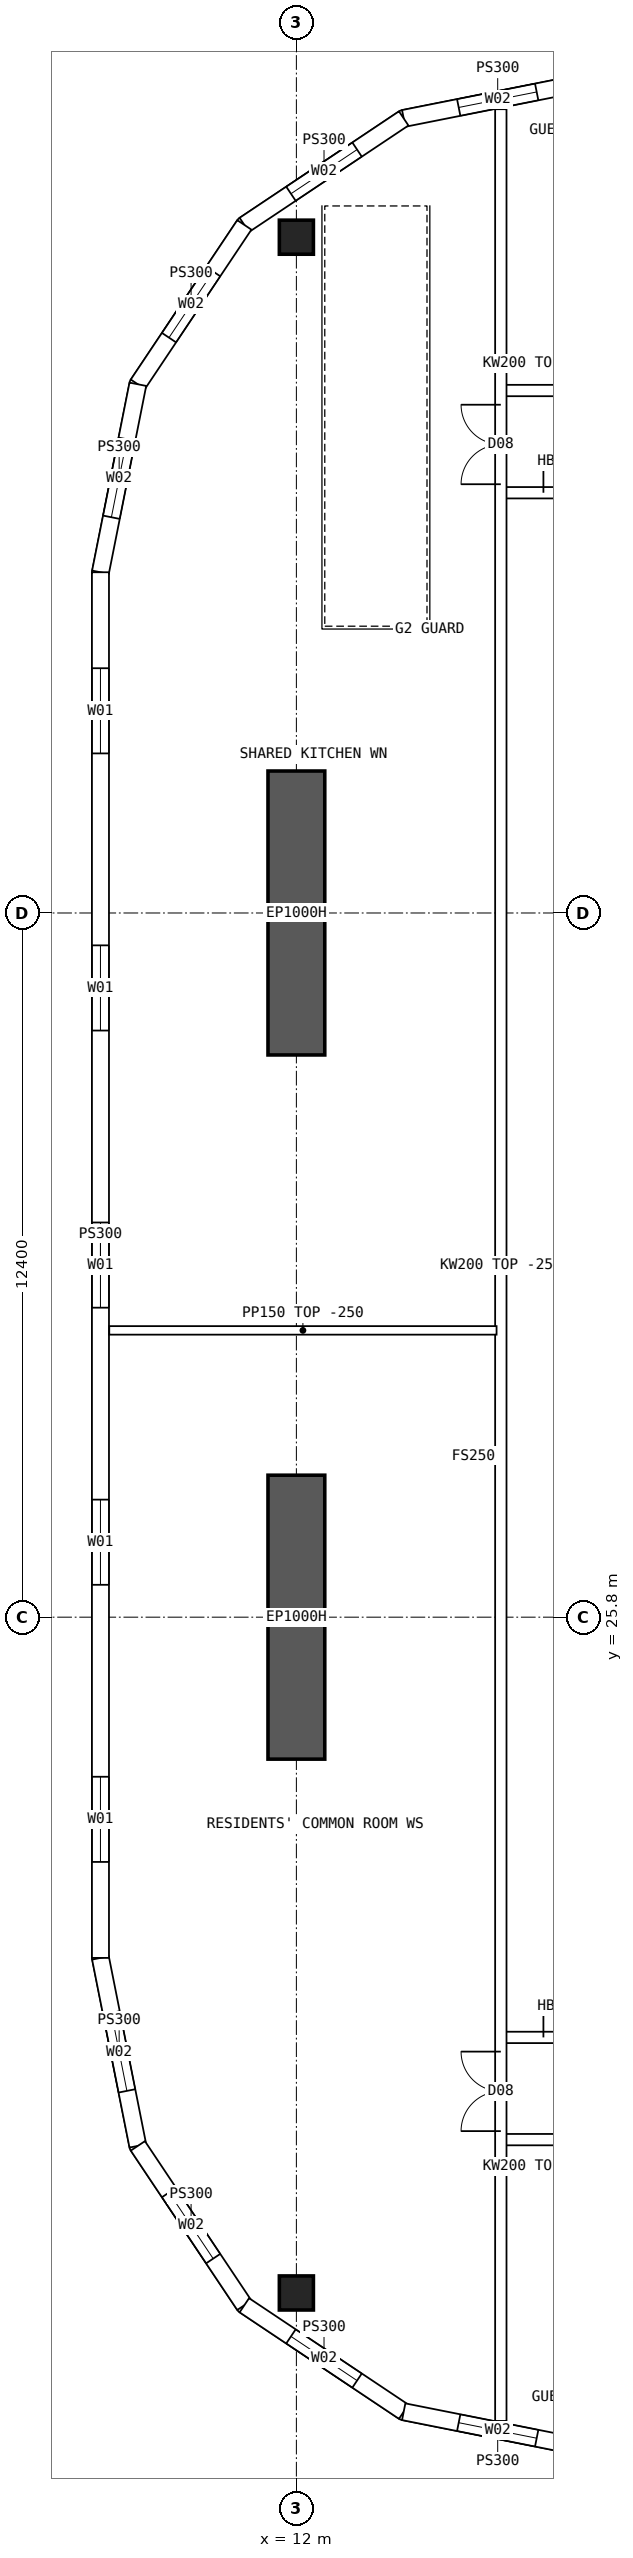
"""IFC4 building model, lengths in metres.
Left out: names, types, materials, properties, quantities, classifications, styles, units other than length and angle.
Written with IfcOpenShell. Run it as: python <this file> out.ifc"""

import sys

from ifc_helpers import new_model, si_unit, direction, frame, frame_2d, origin, origin_2d, place, context, subcontext, project, spatial, polyline, rectangle, hollow_rectangle, outline, extrude, element, fill, save


model = new_model("IFC4")
c1 = context("Model", 3, precision=1e-05, world=origin(), true_north=direction((0.0, 1.0)))
c2 = subcontext(c1, "Body", "Model", "MODEL_VIEW")
j1 = project(units=[si_unit("LENGTHUNIT", "METRE"), si_unit("PLANEANGLEUNIT", "RADIAN")], contexts=[c1])
p1 = place(None, origin())
s1 = spatial("IfcSite", under=j1, at=p1, CompositionType="ELEMENT")
p2 = place(p1, origin())
s2 = spatial("IfcBuilding", under=s1, at=p2, CompositionType="ELEMENT")
p3 = place(p2, frame((0.0, 0.0, 235.3)))
s3 = spatial("IfcBuildingStorey", under=s2, at=p3, CompositionType="ELEMENT", Elevation=235.3)
for number, where, z_axis, x_axis in (
    (1, (12.0, 13.9, 0.0), (0.0, 0.0, 1.0), (1.0, 0.0, 0.0)),
    (2, (12.0, 50.1, 0.0), (0.0, 0.0, 1.0), (1.0, 0.0, 0.0)),
):
    element("IfcColumn", number, at=place(p3, frame(where, z_axis=z_axis, x_axis=x_axis)), inside=s3, PredefinedType="COLUMN", context=c2, shape_type="SweptSolid", body=[
        extrude(hollow_rectangle(XDim=0.6, YDim=0.6, WallThickness=0.06, at=origin_2d()), origin(), (0.0, 0.0, 1.0), 3.75),
    ])
for number, where, z_axis, x_axis in (
    (3, (12.0, 23.3, 0.0), (0.0, 0.0, 1.0), (0.0, 1.0, 0.0)),
    (4, (12.0, 35.7, 0.0), (0.0, 0.0, 1.0), (0.0, 1.0, 0.0)),
):
    element("IfcWall", number, at=place(p3, frame(where, z_axis=z_axis, x_axis=x_axis)), inside=s3, PredefinedType="SHEAR", context=c2, shape_type="SweptSolid", body=[
        extrude(rectangle(XDim=5.0, YDim=1.0, at=frame_2d((2.5, 0.0))), origin(), (0.0, 0.0, 1.0), 3.75),
    ])
p4 = place(p3, frame((8.55, 44.2, 0.0), z_axis=(0.0, 0.0, 1.0), x_axis=(0.0, -1.0, 0.0)))
e5 = element("IfcWall", 5, at=p4, inside=s3, PredefinedType="SOLIDWALL", context=c2, shape_type="SweptSolid", body=[
    extrude(outline(polyline([(-0.015, -0.15), (24.415, -0.15), (24.385, 0.15), (0.015, 0.15), (-0.015, -0.15)])), origin(), (0.0, 0.0, 1.0), 3.5),
])
p5 = place(p4, frame((1.69, 0.0, 0.9)))
e6 = element("IfcOpeningElement", 6, at=p5, cuts=e5, PredefinedType="OPENING", context=c2, shape_type="SweptSolid", body=[
    extrude(rectangle(XDim=1.5, YDim=2.0, at=frame_2d((0.75, 1.0))), frame((0.0, 0.16, 0.0), z_axis=(0.0, -1.0, 0.0), x_axis=(1.0, 0.0, 0.0)), (0.0, 0.0, 1.0), 0.32),
])
p6 = place(p4, frame((6.57, 0.0, 0.9)))
e7 = element("IfcOpeningElement", 7, at=p6, cuts=e5, PredefinedType="OPENING", context=c2, shape_type="SweptSolid", body=[
    extrude(rectangle(XDim=1.5, YDim=2.0, at=frame_2d((0.75, 1.0))), frame((0.0, 0.16, 0.0), z_axis=(0.0, -1.0, 0.0), x_axis=(1.0, 0.0, 0.0)), (0.0, 0.0, 1.0), 0.32),
])
p7 = place(p4, frame((11.45, 0.0, 0.9)))
e8 = element("IfcOpeningElement", 8, at=p7, cuts=e5, PredefinedType="OPENING", context=c2, shape_type="SweptSolid", body=[
    extrude(rectangle(XDim=1.5, YDim=2.0, at=frame_2d((0.75, 1.0))), frame((0.0, 0.16, 0.0), z_axis=(0.0, -1.0, 0.0), x_axis=(1.0, 0.0, 0.0)), (0.0, 0.0, 1.0), 0.32),
])
p8 = place(p4, frame((16.33, 0.0, 0.9)))
e9 = element("IfcOpeningElement", 9, at=p8, cuts=e5, PredefinedType="OPENING", context=c2, shape_type="SweptSolid", body=[
    extrude(rectangle(XDim=1.5, YDim=2.0, at=frame_2d((0.75, 1.0))), frame((0.0, 0.16, 0.0), z_axis=(0.0, -1.0, 0.0), x_axis=(1.0, 0.0, 0.0)), (0.0, 0.0, 1.0), 0.32),
])
p9 = place(p4, frame((21.21, 0.0, 0.9)))
e10 = element("IfcOpeningElement", 10, at=p9, cuts=e5, PredefinedType="OPENING", context=c2, shape_type="SweptSolid", body=[
    extrude(rectangle(XDim=1.5, YDim=2.0, at=frame_2d((0.75, 1.0))), frame((0.0, 0.16, 0.0), z_axis=(0.0, -1.0, 0.0), x_axis=(1.0, 0.0, 0.0)), (0.0, 0.0, 1.0), 0.32),
])
p10 = place(p3, frame((17.2, 52.85, 0.0), z_axis=(0.0, 0.0, 1.0), x_axis=(-0.98078325777, -0.195100490205, 0.0)))
e11 = element("IfcWall", 11, at=p10, inside=s3, PredefinedType="SOLIDWALL", context=c2, shape_type="SweptSolid", body=[
    extrude(outline(polyline([(-0.03, -0.15), (3.405, -0.15), (3.345, 0.15), (0.03, 0.15), (-0.03, -0.15)])), origin(), (0.0, 0.0, 1.0), 3.5),
])
p11 = place(p10, frame((0.988, 0.0, 0.9)))
e12 = element("IfcOpeningElement", 12, at=p11, cuts=e11, PredefinedType="OPENING", context=c2, shape_type="SweptSolid", body=[
    extrude(rectangle(XDim=1.4, YDim=1.8, at=frame_2d((0.7, 0.9))), frame((0.0, 0.16, 0.0), z_axis=(0.0, -1.0, 0.0), x_axis=(1.0, 0.0, 0.0)), (0.0, 0.0, 1.0), 0.32),
])
p12 = place(p3, frame((13.89, 52.192, 0.0), z_axis=(0.0, 0.0, 1.0), x_axis=(-0.831460037396, -0.555584562613, 0.0)))
e13 = element("IfcWall", 13, at=p12, inside=s3, PredefinedType="SOLIDWALL", context=c2, shape_type="SweptSolid", body=[
    extrude(outline(polyline([(-0.03, -0.15), (3.405, -0.15), (3.345, 0.15), (0.03, 0.15), (-0.03, -0.15)])), origin(), (0.0, 0.0, 1.0), 3.5),
])
p13 = place(p12, frame((0.988, 0.0, 0.9)))
e14 = element("IfcOpeningElement", 14, at=p13, cuts=e13, PredefinedType="OPENING", context=c2, shape_type="SweptSolid", body=[
    extrude(rectangle(XDim=1.4, YDim=1.8, at=frame_2d((0.7, 0.9))), frame((0.0, 0.16, 0.0), z_axis=(0.0, -1.0, 0.0), x_axis=(1.0, 0.0, 0.0)), (0.0, 0.0, 1.0), 0.32),
])
p14 = place(p3, frame((11.083, 50.316, 0.0), z_axis=(0.0, 0.0, 1.0), x_axis=(-0.555567969291, -0.831471124873, 0.0)))
e15 = element("IfcWall", 15, at=p14, inside=s3, PredefinedType="SOLIDWALL", context=c2, shape_type="SweptSolid", body=[
    extrude(outline(polyline([(-0.03, -0.15), (3.405, -0.15), (3.345, 0.15), (0.03, 0.15), (-0.03, -0.15)])), origin(), (0.0, 0.0, 1.0), 3.5),
])
p15 = place(p14, frame((0.988, 0.0, 0.9)))
e16 = element("IfcOpeningElement", 16, at=p15, cuts=e15, PredefinedType="OPENING", context=c2, shape_type="SweptSolid", body=[
    extrude(rectangle(XDim=1.4, YDim=1.8, at=frame_2d((0.7, 0.9))), frame((0.0, 0.16, 0.0), z_axis=(0.0, -1.0, 0.0), x_axis=(1.0, 0.0, 0.0)), (0.0, 0.0, 1.0), 0.32),
])
p16 = place(p3, frame((9.208, 47.51, 0.0), z_axis=(0.0, 0.0, 1.0), x_axis=(-0.19508664885, -0.980786011034, 0.0)))
e17 = element("IfcWall", 17, at=p16, inside=s3, PredefinedType="SOLIDWALL", context=c2, shape_type="SweptSolid", body=[
    extrude(outline(polyline([(-0.03, -0.15), (3.39, -0.15), (3.36, 0.15), (0.03, 0.15), (-0.03, -0.15)])), origin(), (0.0, 0.0, 1.0), 3.5),
])
p17 = place(p16, frame((0.988, 0.0, 0.9)))
e18 = element("IfcOpeningElement", 18, at=p17, cuts=e17, PredefinedType="OPENING", context=c2, shape_type="SweptSolid", body=[
    extrude(rectangle(XDim=1.4, YDim=1.8, at=frame_2d((0.7, 0.9))), frame((0.0, 0.16, 0.0), z_axis=(0.0, -1.0, 0.0), x_axis=(1.0, 0.0, 0.0)), (0.0, 0.0, 1.0), 0.32),
])
p18 = place(p3, frame((8.55, 19.8, 0.0), z_axis=(0.0, 0.0, 1.0), x_axis=(0.19508664885, -0.980786011034, 0.0)))
e19 = element("IfcWall", 19, at=p18, inside=s3, PredefinedType="SOLIDWALL", context=c2, shape_type="SweptSolid", body=[
    extrude(outline(polyline([(-0.015, -0.15), (3.405, -0.15), (3.345, 0.15), (0.015, 0.15), (-0.015, -0.15)])), origin(), (0.0, 0.0, 1.0), 3.5),
])
p19 = place(p18, frame((0.988, 0.0, 0.9)))
e20 = element("IfcOpeningElement", 20, at=p19, cuts=e19, PredefinedType="OPENING", context=c2, shape_type="SweptSolid", body=[
    extrude(rectangle(XDim=1.4, YDim=1.8, at=frame_2d((0.7, 0.9))), frame((0.0, 0.16, 0.0), z_axis=(0.0, -1.0, 0.0), x_axis=(1.0, 0.0, 0.0)), (0.0, 0.0, 1.0), 0.32),
])
p20 = place(p3, frame((9.208, 16.49, 0.0), z_axis=(0.0, 0.0, 1.0), x_axis=(0.555567969291, -0.831471124873, 0.0)))
e21 = element("IfcWall", 21, at=p20, inside=s3, PredefinedType="SOLIDWALL", context=c2, shape_type="SweptSolid", body=[
    extrude(outline(polyline([(-0.03, -0.15), (3.405, -0.15), (3.345, 0.15), (0.03, 0.15), (-0.03, -0.15)])), origin(), (0.0, 0.0, 1.0), 3.5),
])
p21 = place(p20, frame((0.988, 0.0, 0.9)))
e22 = element("IfcOpeningElement", 22, at=p21, cuts=e21, PredefinedType="OPENING", context=c2, shape_type="SweptSolid", body=[
    extrude(rectangle(XDim=1.4, YDim=1.8, at=frame_2d((0.7, 0.9))), frame((0.0, 0.16, 0.0), z_axis=(0.0, -1.0, 0.0), x_axis=(1.0, 0.0, 0.0)), (0.0, 0.0, 1.0), 0.32),
])
p22 = place(p3, frame((11.083, 13.684, 0.0), z_axis=(0.0, 0.0, 1.0), x_axis=(0.831460037396, -0.555584562613, 0.0)))
e23 = element("IfcWall", 23, at=p22, inside=s3, PredefinedType="SOLIDWALL", context=c2, shape_type="SweptSolid", body=[
    extrude(outline(polyline([(-0.03, -0.15), (3.405, -0.15), (3.345, 0.15), (0.03, 0.15), (-0.03, -0.15)])), origin(), (0.0, 0.0, 1.0), 3.5),
])
p23 = place(p22, frame((0.988, 0.0, 0.9)))
e24 = element("IfcOpeningElement", 24, at=p23, cuts=e23, PredefinedType="OPENING", context=c2, shape_type="SweptSolid", body=[
    extrude(rectangle(XDim=1.4, YDim=1.8, at=frame_2d((0.7, 0.9))), frame((0.0, 0.16, 0.0), z_axis=(0.0, -1.0, 0.0), x_axis=(1.0, 0.0, 0.0)), (0.0, 0.0, 1.0), 0.32),
])
p24 = place(p3, frame((13.89, 11.808, 0.0), z_axis=(0.0, 0.0, 1.0), x_axis=(0.98078325777, -0.195100490205, 0.0)))
e25 = element("IfcWall", 25, at=p24, inside=s3, PredefinedType="SOLIDWALL", context=c2, shape_type="SweptSolid", body=[
    extrude(outline(polyline([(-0.03, -0.15), (3.405, -0.15), (3.345, 0.15), (0.03, 0.15), (-0.03, -0.15)])), origin(), (0.0, 0.0, 1.0), 3.5),
])
p25 = place(p24, frame((0.988, 0.0, 0.9)))
e26 = element("IfcOpeningElement", 26, at=p25, cuts=e25, PredefinedType="OPENING", context=c2, shape_type="SweptSolid", body=[
    extrude(rectangle(XDim=1.4, YDim=1.8, at=frame_2d((0.7, 0.9))), frame((0.0, 0.16, 0.0), z_axis=(0.0, -1.0, 0.0), x_axis=(1.0, 0.0, 0.0)), (0.0, 0.0, 1.0), 0.32),
])
p26 = place(p3, frame((15.6, 16.6, 0.0), z_axis=(0.0, 0.0, 1.0), x_axis=(1.0, 0.0, 0.0)))
e27 = element("IfcWall", 27, at=p26, inside=s3, PredefinedType="SOLIDWALL", context=c2, shape_type="SweptSolid", body=[
    extrude(rectangle(XDim=2.05, YDim=0.2, at=frame_2d((1.025, 0.0))), origin(), (0.0, 0.0, 1.0), 3.5),
])
p27 = place(p26, frame((0.95, 0.0, 0.0)))
e28 = element("IfcOpeningElement", 28, at=p27, cuts=e27, PredefinedType="OPENING", context=c2, shape_type="SweptSolid", body=[
    extrude(rectangle(XDim=0.9, YDim=2.1, at=frame_2d((0.45, 1.05))), frame((0.0, 0.11, 0.0), z_axis=(0.0, -1.0, 0.0), x_axis=(1.0, 0.0, 0.0)), (0.0, 0.0, 1.0), 0.22),
])
p28 = place(p3, frame((15.6, 18.4, 0.0), z_axis=(0.0, 0.0, 1.0), x_axis=(1.0, 0.0, 0.0)))
e29 = element("IfcWall", 29, at=p28, inside=s3, PredefinedType="SOLIDWALL", context=c2, shape_type="SweptSolid", body=[
    extrude(rectangle(XDim=2.05, YDim=0.2, at=frame_2d((1.025, 0.0))), origin(), (0.0, 0.0, 1.0), 3.5),
])
p29 = place(p28, frame((0.75, 0.0, 0.0)))
e30 = element("IfcOpeningElement", 30, at=p29, cuts=e29, PredefinedType="OPENING", context=c2, shape_type="SweptSolid", body=[
    extrude(rectangle(XDim=1.2, YDim=2.1, at=frame_2d((0.6, 1.05))), frame((0.0, 0.11, 0.0), z_axis=(0.0, -1.0, 0.0), x_axis=(1.0, 0.0, 0.0)), (0.0, 0.0, 1.0), 0.22),
])
p30 = place(p3, frame((15.6, 47.4, 0.0), z_axis=(0.0, 0.0, 1.0), x_axis=(1.0, 0.0, 0.0)))
e31 = element("IfcWall", 31, at=p30, inside=s3, PredefinedType="SOLIDWALL", context=c2, shape_type="SweptSolid", body=[
    extrude(rectangle(XDim=2.05, YDim=0.2, at=frame_2d((1.025, 0.0))), origin(), (0.0, 0.0, 1.0), 3.5),
])
p31 = place(p30, frame((0.95, 0.0, 0.0)))
e32 = element("IfcOpeningElement", 32, at=p31, cuts=e31, PredefinedType="OPENING", context=c2, shape_type="SweptSolid", body=[
    extrude(rectangle(XDim=0.9, YDim=2.1, at=frame_2d((0.45, 1.05))), frame((0.0, 0.11, 0.0), z_axis=(0.0, -1.0, 0.0), x_axis=(1.0, 0.0, 0.0)), (0.0, 0.0, 1.0), 0.22),
])
p32 = place(p3, frame((15.6, 45.6, 0.0), z_axis=(0.0, 0.0, 1.0), x_axis=(1.0, 0.0, 0.0)))
e33 = element("IfcWall", 33, at=p32, inside=s3, PredefinedType="SOLIDWALL", context=c2, shape_type="SweptSolid", body=[
    extrude(rectangle(XDim=2.05, YDim=0.2, at=frame_2d((1.025, 0.0))), origin(), (0.0, 0.0, 1.0), 3.5),
])
p33 = place(p32, frame((0.75, 0.0, 0.0)))
e34 = element("IfcOpeningElement", 34, at=p33, cuts=e33, PredefinedType="OPENING", context=c2, shape_type="SweptSolid", body=[
    extrude(rectangle(XDim=1.2, YDim=2.1, at=frame_2d((0.6, 1.05))), frame((0.0, 0.11, 0.0), z_axis=(0.0, -1.0, 0.0), x_axis=(1.0, 0.0, 0.0)), (0.0, 0.0, 1.0), 0.22),
])
p34 = place(p3, frame((8.705, 30.85, 0.0), z_axis=(0.0, 0.0, 1.0), x_axis=(1.0, 0.0, 0.0)))
e35 = element("IfcWall", 35, at=p34, inside=s3, PredefinedType="PARTITIONING", context=c2, shape_type="SweptSolid", body=[
    extrude(outline(polyline([(0.0, 0.0), (6.82, 0.0), (6.82, 3.5), (3.597, 3.5), (3.595, 3.05), (2.997, 3.05), (2.995, 3.5), (0.0, 3.5), (0.0, 0.0)])), frame((0.0, 0.075, 0.0), z_axis=(0.0, -1.0, 0.0), x_axis=(1.0, 0.0, 0.0)), (0.0, 0.0, 1.0), 0.15),
])
p35 = place(p3, frame((15.6, 11.646, 0.0), z_axis=(0.0, 0.0, 1.0), x_axis=(0.0, 1.0, 0.0)))
e36 = element("IfcWall", 36, at=p35, inside=s3, PredefinedType="SOLIDWALL", context=c2, shape_type="SweptSolid", body=[
    extrude(rectangle(XDim=40.708, YDim=0.2, at=frame_2d((20.354, 0.0))), origin(), (0.0, 0.0, 1.0), 3.5),
])
p36 = place(p35, frame((5.104, 0.0, 0.0)))
e37 = element("IfcOpeningElement", 37, at=p36, cuts=e36, PredefinedType="OPENING", context=c2, shape_type="SweptSolid", body=[
    extrude(rectangle(XDim=1.4, YDim=2.1, at=frame_2d((0.7, 1.05))), frame((0.0, 0.11, 0.0), z_axis=(0.0, -1.0, 0.0), x_axis=(1.0, 0.0, 0.0)), (0.0, 0.0, 1.0), 0.22),
])
p37 = place(p35, frame((34.104, 0.0, 0.0)))
e38 = element("IfcOpeningElement", 38, at=p37, cuts=e36, PredefinedType="OPENING", context=c2, shape_type="SweptSolid", body=[
    extrude(rectangle(XDim=1.4, YDim=2.1, at=frame_2d((0.7, 1.05))), frame((0.0, 0.11, 0.0), z_axis=(0.0, -1.0, 0.0), x_axis=(1.0, 0.0, 0.0)), (0.0, 0.0, 1.0), 0.22),
])
p38 = place(p5, origin())
e39 = element("IfcWindow", 39, at=p38, inside=s3, PartitioningType="SINGLE_PANEL", PredefinedType="WINDOW", context=c2, shape_type="SweptSolid", body=[
    extrude(rectangle(XDim=1.5, YDim=2.0, at=frame_2d((0.75, 1.0))), frame((0.0, 0.03, 0.0), z_axis=(0.0, -1.0, 0.0), x_axis=(1.0, 0.0, 0.0)), (0.0, 0.0, 1.0), 0.06),
])
fill(e6, e39)
p39 = place(p6, origin())
e40 = element("IfcWindow", 40, at=p39, inside=s3, PartitioningType="SINGLE_PANEL", PredefinedType="WINDOW", context=c2, shape_type="SweptSolid", body=[
    extrude(rectangle(XDim=1.5, YDim=2.0, at=frame_2d((0.75, 1.0))), frame((0.0, 0.03, 0.0), z_axis=(0.0, -1.0, 0.0), x_axis=(1.0, 0.0, 0.0)), (0.0, 0.0, 1.0), 0.06),
])
fill(e7, e40)
p40 = place(p7, origin())
e41 = element("IfcWindow", 41, at=p40, inside=s3, PartitioningType="SINGLE_PANEL", PredefinedType="WINDOW", context=c2, shape_type="SweptSolid", body=[
    extrude(rectangle(XDim=1.5, YDim=2.0, at=frame_2d((0.75, 1.0))), frame((0.0, 0.03, 0.0), z_axis=(0.0, -1.0, 0.0), x_axis=(1.0, 0.0, 0.0)), (0.0, 0.0, 1.0), 0.06),
])
fill(e8, e41)
p41 = place(p8, origin())
e42 = element("IfcWindow", 42, at=p41, inside=s3, PartitioningType="SINGLE_PANEL", PredefinedType="WINDOW", context=c2, shape_type="SweptSolid", body=[
    extrude(rectangle(XDim=1.5, YDim=2.0, at=frame_2d((0.75, 1.0))), frame((0.0, 0.03, 0.0), z_axis=(0.0, -1.0, 0.0), x_axis=(1.0, 0.0, 0.0)), (0.0, 0.0, 1.0), 0.06),
])
fill(e9, e42)
p42 = place(p9, origin())
e43 = element("IfcWindow", 43, at=p42, inside=s3, PartitioningType="SINGLE_PANEL", PredefinedType="WINDOW", context=c2, shape_type="SweptSolid", body=[
    extrude(rectangle(XDim=1.5, YDim=2.0, at=frame_2d((0.75, 1.0))), frame((0.0, 0.03, 0.0), z_axis=(0.0, -1.0, 0.0), x_axis=(1.0, 0.0, 0.0)), (0.0, 0.0, 1.0), 0.06),
])
fill(e10, e43)
p43 = place(p11, origin())
e44 = element("IfcWindow", 44, at=p43, inside=s3, PartitioningType="SINGLE_PANEL", PredefinedType="WINDOW", context=c2, shape_type="SweptSolid", body=[
    extrude(rectangle(XDim=1.4, YDim=1.8, at=frame_2d((0.7, 0.9))), frame((0.0, 0.03, 0.0), z_axis=(0.0, -1.0, 0.0), x_axis=(1.0, 0.0, 0.0)), (0.0, 0.0, 1.0), 0.06),
])
fill(e12, e44)
p44 = place(p13, origin())
e45 = element("IfcWindow", 45, at=p44, inside=s3, PartitioningType="SINGLE_PANEL", PredefinedType="WINDOW", context=c2, shape_type="SweptSolid", body=[
    extrude(rectangle(XDim=1.4, YDim=1.8, at=frame_2d((0.7, 0.9))), frame((0.0, 0.03, 0.0), z_axis=(0.0, -1.0, 0.0), x_axis=(1.0, 0.0, 0.0)), (0.0, 0.0, 1.0), 0.06),
])
fill(e14, e45)
p45 = place(p15, origin())
e46 = element("IfcWindow", 46, at=p45, inside=s3, PartitioningType="SINGLE_PANEL", PredefinedType="WINDOW", context=c2, shape_type="SweptSolid", body=[
    extrude(rectangle(XDim=1.4, YDim=1.8, at=frame_2d((0.7, 0.9))), frame((0.0, 0.03, 0.0), z_axis=(0.0, -1.0, 0.0), x_axis=(1.0, 0.0, 0.0)), (0.0, 0.0, 1.0), 0.06),
])
fill(e16, e46)
p46 = place(p17, origin())
e47 = element("IfcWindow", 47, at=p46, inside=s3, PartitioningType="SINGLE_PANEL", PredefinedType="WINDOW", context=c2, shape_type="SweptSolid", body=[
    extrude(rectangle(XDim=1.4, YDim=1.8, at=frame_2d((0.7, 0.9))), frame((0.0, 0.03, 0.0), z_axis=(0.0, -1.0, 0.0), x_axis=(1.0, 0.0, 0.0)), (0.0, 0.0, 1.0), 0.06),
])
fill(e18, e47)
p47 = place(p19, origin())
e48 = element("IfcWindow", 48, at=p47, inside=s3, PartitioningType="SINGLE_PANEL", PredefinedType="WINDOW", context=c2, shape_type="SweptSolid", body=[
    extrude(rectangle(XDim=1.4, YDim=1.8, at=frame_2d((0.7, 0.9))), frame((0.0, 0.03, 0.0), z_axis=(0.0, -1.0, 0.0), x_axis=(1.0, 0.0, 0.0)), (0.0, 0.0, 1.0), 0.06),
])
fill(e20, e48)
p48 = place(p21, origin())
e49 = element("IfcWindow", 49, at=p48, inside=s3, PartitioningType="SINGLE_PANEL", PredefinedType="WINDOW", context=c2, shape_type="SweptSolid", body=[
    extrude(rectangle(XDim=1.4, YDim=1.8, at=frame_2d((0.7, 0.9))), frame((0.0, 0.03, 0.0), z_axis=(0.0, -1.0, 0.0), x_axis=(1.0, 0.0, 0.0)), (0.0, 0.0, 1.0), 0.06),
])
fill(e22, e49)
p49 = place(p23, origin())
e50 = element("IfcWindow", 50, at=p49, inside=s3, PartitioningType="SINGLE_PANEL", PredefinedType="WINDOW", context=c2, shape_type="SweptSolid", body=[
    extrude(rectangle(XDim=1.4, YDim=1.8, at=frame_2d((0.7, 0.9))), frame((0.0, 0.03, 0.0), z_axis=(0.0, -1.0, 0.0), x_axis=(1.0, 0.0, 0.0)), (0.0, 0.0, 1.0), 0.06),
])
fill(e24, e50)
p50 = place(p25, origin())
e51 = element("IfcWindow", 51, at=p50, inside=s3, PartitioningType="SINGLE_PANEL", PredefinedType="WINDOW", context=c2, shape_type="SweptSolid", body=[
    extrude(rectangle(XDim=1.4, YDim=1.8, at=frame_2d((0.7, 0.9))), frame((0.0, 0.03, 0.0), z_axis=(0.0, -1.0, 0.0), x_axis=(1.0, 0.0, 0.0)), (0.0, 0.0, 1.0), 0.06),
])
fill(e26, e51)
p51 = place(p29, origin())
e52 = element("IfcDoor", 52, at=p51, inside=s3, OperationType="DOUBLE_DOOR_SINGLE_SWING", PredefinedType="DOOR", context=c2, shape_type="SweptSolid", body=[
    extrude(rectangle(XDim=1.2, YDim=2.1, at=frame_2d((0.6, 1.05))), frame((0.0, 0.025, 0.0), z_axis=(0.0, -1.0, 0.0), x_axis=(1.0, 0.0, 0.0)), (0.0, 0.0, 1.0), 0.05),
])
fill(e30, e52)
p52 = place(p33, origin())
e53 = element("IfcDoor", 53, at=p52, inside=s3, OperationType="DOUBLE_DOOR_SINGLE_SWING", PredefinedType="DOOR", context=c2, shape_type="SweptSolid", body=[
    extrude(rectangle(XDim=1.2, YDim=2.1, at=frame_2d((0.6, 1.05))), frame((0.0, 0.025, 0.0), z_axis=(0.0, -1.0, 0.0), x_axis=(1.0, 0.0, 0.0)), (0.0, 0.0, 1.0), 0.05),
])
fill(e34, e53)
p53 = place(p36, origin())
e54 = element("IfcDoor", 54, at=p53, inside=s3, OperationType="DOUBLE_DOOR_SINGLE_SWING", PredefinedType="DOOR", context=c2, shape_type="SweptSolid", body=[
    extrude(rectangle(XDim=1.4, YDim=2.1, at=frame_2d((0.7, 1.05))), frame((0.0, 0.025, 0.0), z_axis=(0.0, -1.0, 0.0), x_axis=(1.0, 0.0, 0.0)), (0.0, 0.0, 1.0), 0.05),
])
fill(e37, e54)
p54 = place(p37, origin())
e55 = element("IfcDoor", 55, at=p54, inside=s3, OperationType="DOUBLE_DOOR_SINGLE_SWING", PredefinedType="DOOR", context=c2, shape_type="SweptSolid", body=[
    extrude(rectangle(XDim=1.4, YDim=2.1, at=frame_2d((0.7, 1.05))), frame((0.0, 0.025, 0.0), z_axis=(0.0, -1.0, 0.0), x_axis=(1.0, 0.0, 0.0)), (0.0, 0.0, 1.0), 0.05),
])
fill(e38, e55)
save(model, sys.argv[1])
